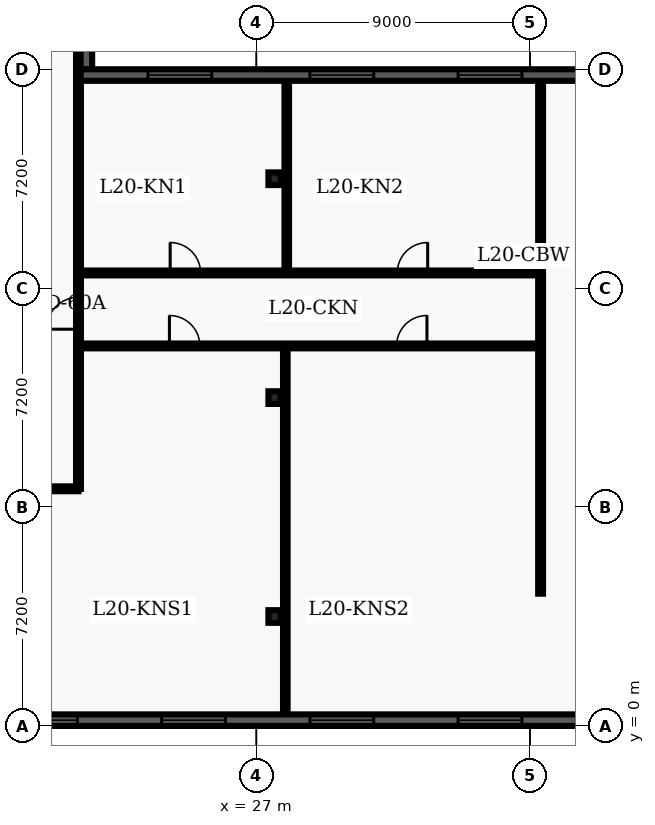
"""IFC4 building model, lengths in metres.
Left out: names, types, materials, properties, quantities, classifications, styles, units other than length and angle.
Written with IfcOpenShell. Run it as: python <this file> out.ifc"""

import sys

from ifc_helpers import new_model, entity, si_unit, converted_unit, direction, frame, origin_with_axes, origin_2d_with_axis, place, context, subcontext, project, spatial, polyline, rectangle, i_section, outline, extrude, element, fill, save


model = new_model("IFC4")
c1 = context("Model", 3, precision=1e-05, world=origin_with_axes(), true_north=direction((0.0, 1.0)))
c2 = subcontext(c1, "Body", "Model", "MODEL_VIEW")
j1 = project(units=[si_unit("LENGTHUNIT", "METRE"), converted_unit("PLANEANGLEUNIT", "DEGREE", entity("IfcPlaneAngleMeasure", 0.017), si_unit("PLANEANGLEUNIT", "RADIAN"), dimensions=[0, 0, 0, 0, 0, 0, 0])], contexts=[c1])
p1 = place(None, origin_with_axes())
s1 = spatial("IfcSite", under=j1, at=p1, CompositionType="ELEMENT")
p2 = place(p1, origin_with_axes())
s2 = spatial("IfcBuilding", under=s1, at=p2, CompositionType="ELEMENT")
p3 = place(p2, frame((0.0, 0.0, 84.6), z_axis=(0.0, 0.0, 1.0), x_axis=(1.0, 0.0, 0.0)))
s3 = spatial("IfcBuildingStorey", under=s2, at=p3, CompositionType="ELEMENT", Elevation=84.6)
for number, where, z_axis, x_axis in (
    (1, (27.6, 3.6, 0.0), (0.0, 0.0, 1.0), (1.0, 0.0, 0.0)),
    (2, (27.6, 10.8, 0.0), (0.0, 0.0, 1.0), (1.0, 0.0, 0.0)),
    (3, (27.6, 18.0, 0.0), (0.0, 0.0, 1.0), (1.0, 0.0, 0.0)),
):
    element("IfcColumn", number, at=place(p3, frame(where, z_axis=z_axis, x_axis=x_axis)), inside=s3, PredefinedType="COLUMN", context=c2, shape_type="SweptSolid", body=[
        extrude(i_section(OverallWidth=0.406, OverallDepth=0.416, WebThickness=0.03, FlangeThickness=0.048, FilletRadius=0.022, at=origin_2d_with_axis()), origin_with_axes(), (0.0, 0.0, 1.0), 4.5),
    ])
p4 = place(p3, frame((2.6, 7.8, 0.0), z_axis=(0.0, 0.0, 1.0), x_axis=(1.0, 0.0, 0.0)))
e4 = element("IfcWall", 4, at=p4, inside=s3, PredefinedType="PARTITIONING", context=c2, shape_type="SweptSolid", body=[
    extrude(outline(polyline([(0.0, -0.08), (18.55, -0.08), (18.55, 0.08), (0.0, 0.08), (0.0, -0.08)])), origin_with_axes(), (0.0, 0.0, 1.0), 3.2),
])
p5 = place(p4, frame((2.501, 0.0, 0.0), z_axis=(0.0, 0.0, 1.0), x_axis=(1.0, 0.0, 0.0)))
e5 = element("IfcOpeningElement", 5, at=p5, cuts=e4, PredefinedType="OPENING", context=c2, shape_type="SweptSolid", body=[
    extrude(rectangle(XDim=1.0, YDim=0.18, at=origin_2d_with_axis()), origin_with_axes(), (0.0, 0.0, 1.0), 2.15),
])
p6 = place(p4, frame((8.018, 0.0, 0.0), z_axis=(0.0, 0.0, 1.0), x_axis=(1.0, 0.0, 0.0)))
e6 = element("IfcOpeningElement", 6, at=p6, cuts=e4, PredefinedType="OPENING", context=c2, shape_type="SweptSolid", body=[
    extrude(rectangle(XDim=1.0, YDim=0.18, at=origin_2d_with_axis()), origin_with_axes(), (0.0, 0.0, 1.0), 2.15),
])
p7 = place(p4, frame((14.762, 0.0, 0.0), z_axis=(0.0, 0.0, 1.0), x_axis=(1.0, 0.0, 0.0)))
e7 = element("IfcOpeningElement", 7, at=p7, cuts=e4, PredefinedType="OPENING", context=c2, shape_type="SweptSolid", body=[
    extrude(rectangle(XDim=1.2, YDim=0.18, at=origin_2d_with_axis()), origin_with_axes(), (0.0, 0.0, 1.0), 2.2),
])
p8 = place(p3, frame((21.15, 7.8, 0.0), z_axis=(0.0, 0.0, 1.0), x_axis=(0.0, 1.0, 0.0)))
e8 = element("IfcWall", 8, at=p8, inside=s3, PredefinedType="PARTITIONING", context=c2, shape_type="SweptSolid", body=[
    extrude(outline(polyline([(0.0, -0.08), (32.7, -0.08), (32.7, 0.08), (0.0, 0.08), (0.0, -0.08)])), origin_with_axes(), (0.0, 0.0, 1.0), 3.2),
])
p9 = place(p8, frame((5.775, 0.0, 0.0), z_axis=(0.0, 0.0, 1.0), x_axis=(1.0, 0.0, 0.0)))
e9 = element("IfcOpeningElement", 9, at=p9, cuts=e8, PredefinedType="OPENING", context=c2, shape_type="SweptSolid", body=[
    extrude(rectangle(XDim=1.05, YDim=0.18, at=origin_2d_with_axis()), origin_with_axes(), (0.0, 0.0, 1.0), 2.15),
])
p10 = place(p3, frame((21.15, 12.5, 0.0), z_axis=(0.0, 0.0, 1.0), x_axis=(1.0, 0.0, 0.0)))
e10 = element("IfcWall", 10, at=p10, inside=s3, PredefinedType="PARTITIONING", context=c2, shape_type="SweptSolid", body=[
    extrude(outline(polyline([(0.0, -0.08), (15.2, -0.08), (15.2, 0.08), (0.0, 0.08), (0.0, -0.08)])), origin_with_axes(), (0.0, 0.0, 1.0), 3.2),
])
p11 = place(p10, frame((3.491, 0.0, 0.0), z_axis=(0.0, 0.0, 1.0), x_axis=(1.0, 0.0, 0.0)))
e11 = element("IfcOpeningElement", 11, at=p11, cuts=e10, PredefinedType="OPENING", context=c2, shape_type="SweptSolid", body=[
    extrude(rectangle(XDim=1.0, YDim=0.18, at=origin_2d_with_axis()), origin_with_axes(), (0.0, 0.0, 1.0), 2.15),
])
p12 = place(p10, frame((10.961, 0.0, 0.0), z_axis=(0.0, 0.0, 1.0), x_axis=(1.0, 0.0, 0.0)))
e12 = element("IfcOpeningElement", 12, at=p12, cuts=e10, PredefinedType="OPENING", context=c2, shape_type="SweptSolid", body=[
    extrude(rectangle(XDim=1.0, YDim=0.18, at=origin_2d_with_axis()), origin_with_axes(), (0.0, 0.0, 1.0), 2.15),
])
p13 = place(p3, frame((21.15, 14.9, 0.0), z_axis=(0.0, 0.0, 1.0), x_axis=(1.0, 0.0, 0.0)))
e13 = element("IfcWall", 13, at=p13, inside=s3, PredefinedType="PARTITIONING", context=c2, shape_type="SweptSolid", body=[
    extrude(outline(polyline([(0.0, -0.08), (15.2, -0.08), (15.2, 0.08), (0.0, 0.08), (0.0, -0.08)])), origin_with_axes(), (0.0, 0.0, 1.0), 3.2),
])
p14 = place(p13, frame((3.515, 0.0, 0.0), z_axis=(0.0, 0.0, 1.0), x_axis=(1.0, 0.0, 0.0)))
e14 = element("IfcOpeningElement", 14, at=p14, cuts=e13, PredefinedType="OPENING", context=c2, shape_type="SweptSolid", body=[
    extrude(rectangle(XDim=1.0, YDim=0.18, at=origin_2d_with_axis()), origin_with_axes(), (0.0, 0.0, 1.0), 2.15),
])
p15 = place(p13, frame((10.986, 0.0, 0.0), z_axis=(0.0, 0.0, 1.0), x_axis=(1.0, 0.0, 0.0)))
e15 = element("IfcOpeningElement", 15, at=p15, cuts=e13, PredefinedType="OPENING", context=c2, shape_type="SweptSolid", body=[
    extrude(rectangle(XDim=1.0, YDim=0.18, at=origin_2d_with_axis()), origin_with_axes(), (0.0, 0.0, 1.0), 2.15),
])
p16 = place(p3, frame((36.35, 4.35, 0.0), z_axis=(0.0, 0.0, 1.0), x_axis=(0.0, 1.0, 0.0)))
e16 = element("IfcWall", 16, at=p16, inside=s3, PredefinedType="PARTITIONING", context=c2, shape_type="SweptSolid", body=[
    extrude(outline(polyline([(0.0, -0.08), (16.95, -0.08), (16.95, 0.08), (0.0, 0.08), (0.0, -0.08)])), origin_with_axes(), (0.0, 0.0, 1.0), 3.2),
])
p17 = place(p3, frame((27.953, 0.36, 0.0), z_axis=(0.0, 0.0, 1.0), x_axis=(0.0, 1.0, 0.0)))
e17 = element("IfcWall", 17, at=p17, inside=s3, PredefinedType="PARTITIONING", context=c2, shape_type="SweptSolid", body=[
    extrude(outline(polyline([(0.0, -0.075), (12.02, -0.075), (12.02, 0.075), (0.0, 0.075), (0.0, -0.075)])), origin_with_axes(), (0.0, 0.0, 1.0), 3.2),
])
p18 = place(p3, frame((28.001, 15.02, 0.0), z_axis=(0.0, 0.0, 1.0), x_axis=(0.0, 1.0, 0.0)))
e18 = element("IfcWall", 18, at=p18, inside=s3, PredefinedType="PARTITIONING", context=c2, shape_type="SweptSolid", body=[
    extrude(outline(polyline([(0.0, -0.075), (6.205, -0.075), (6.205, 0.075), (0.0, 0.075), (0.0, -0.075)])), origin_with_axes(), (0.0, 0.0, 1.0), 3.2),
])
p19 = place(p3, frame((57.22, 0.19, 0.0), z_axis=(0.0, 0.0, 1.0), x_axis=(-1.0, 0.0, 0.0)))
e19 = element("IfcWall", 19, at=p19, inside=s3, PredefinedType="SOLIDWALL", context=c2, shape_type="SweptSolid", body=[
    extrude(outline(polyline([(0.0, -0.19), (54.82, -0.19), (54.82, 0.19), (0.0, 0.19), (0.0, -0.19)])), origin_with_axes(), (0.0, 0.0, 1.0), 4.26),
])
p20 = place(p19, frame((3.037, 0.0, 0.45), z_axis=(0.0, 0.0, 1.0), x_axis=(1.0, 0.0, 0.0)))
e20 = element("IfcOpeningElement", 20, at=p20, cuts=e19, PredefinedType="OPENING", context=c2, shape_type="SweptSolid", body=[
    extrude(rectangle(XDim=2.1, YDim=0.4, at=origin_2d_with_axis()), origin_with_axes(), (0.0, 0.0, 1.0), 2.2),
])
p21 = place(p19, frame((7.912, 0.0, 0.45), z_axis=(0.0, 0.0, 1.0), x_axis=(1.0, 0.0, 0.0)))
e21 = element("IfcOpeningElement", 21, at=p21, cuts=e19, PredefinedType="OPENING", context=c2, shape_type="SweptSolid", body=[
    extrude(rectangle(XDim=2.1, YDim=0.4, at=origin_2d_with_axis()), origin_with_axes(), (0.0, 0.0, 1.0), 2.2),
])
p22 = place(p19, frame((12.786, 0.0, 0.45), z_axis=(0.0, 0.0, 1.0), x_axis=(1.0, 0.0, 0.0)))
e22 = element("IfcOpeningElement", 22, at=p22, cuts=e19, PredefinedType="OPENING", context=c2, shape_type="SweptSolid", body=[
    extrude(rectangle(XDim=2.1, YDim=0.4, at=origin_2d_with_axis()), origin_with_axes(), (0.0, 0.0, 1.0), 2.2),
])
p23 = place(p19, frame((17.661, 0.0, 0.45), z_axis=(0.0, 0.0, 1.0), x_axis=(1.0, 0.0, 0.0)))
e23 = element("IfcOpeningElement", 23, at=p23, cuts=e19, PredefinedType="OPENING", context=c2, shape_type="SweptSolid", body=[
    extrude(rectangle(XDim=2.1, YDim=0.4, at=origin_2d_with_axis()), origin_with_axes(), (0.0, 0.0, 1.0), 2.2),
])
p24 = place(p19, frame((22.535, 0.0, 0.45), z_axis=(0.0, 0.0, 1.0), x_axis=(1.0, 0.0, 0.0)))
e24 = element("IfcOpeningElement", 24, at=p24, cuts=e19, PredefinedType="OPENING", context=c2, shape_type="SweptSolid", body=[
    extrude(rectangle(XDim=2.1, YDim=0.4, at=origin_2d_with_axis()), origin_with_axes(), (0.0, 0.0, 1.0), 2.2),
])
p25 = place(p19, frame((27.41, 0.0, 0.45), z_axis=(0.0, 0.0, 1.0), x_axis=(1.0, 0.0, 0.0)))
e25 = element("IfcOpeningElement", 25, at=p25, cuts=e19, PredefinedType="OPENING", context=c2, shape_type="SweptSolid", body=[
    extrude(rectangle(XDim=2.1, YDim=0.4, at=origin_2d_with_axis()), origin_with_axes(), (0.0, 0.0, 1.0), 2.2),
])
p26 = place(p19, frame((32.285, 0.0, 0.45), z_axis=(0.0, 0.0, 1.0), x_axis=(1.0, 0.0, 0.0)))
e26 = element("IfcOpeningElement", 26, at=p26, cuts=e19, PredefinedType="OPENING", context=c2, shape_type="SweptSolid", body=[
    extrude(rectangle(XDim=2.1, YDim=0.4, at=origin_2d_with_axis()), origin_with_axes(), (0.0, 0.0, 1.0), 2.2),
])
p27 = place(p19, frame((37.159, 0.0, 0.45), z_axis=(0.0, 0.0, 1.0), x_axis=(1.0, 0.0, 0.0)))
e27 = element("IfcOpeningElement", 27, at=p27, cuts=e19, PredefinedType="OPENING", context=c2, shape_type="SweptSolid", body=[
    extrude(rectangle(XDim=2.1, YDim=0.4, at=origin_2d_with_axis()), origin_with_axes(), (0.0, 0.0, 1.0), 2.2),
])
p28 = place(p19, frame((42.034, 0.0, 0.45), z_axis=(0.0, 0.0, 1.0), x_axis=(1.0, 0.0, 0.0)))
e28 = element("IfcOpeningElement", 28, at=p28, cuts=e19, PredefinedType="OPENING", context=c2, shape_type="SweptSolid", body=[
    extrude(rectangle(XDim=2.1, YDim=0.4, at=origin_2d_with_axis()), origin_with_axes(), (0.0, 0.0, 1.0), 2.2),
])
p29 = place(p19, frame((46.908, 0.0, 0.45), z_axis=(0.0, 0.0, 1.0), x_axis=(1.0, 0.0, 0.0)))
e29 = element("IfcOpeningElement", 29, at=p29, cuts=e19, PredefinedType="OPENING", context=c2, shape_type="SweptSolid", body=[
    extrude(rectangle(XDim=2.1, YDim=0.4, at=origin_2d_with_axis()), origin_with_axes(), (0.0, 0.0, 1.0), 2.2),
])
p30 = place(p19, frame((51.783, 0.0, 0.45), z_axis=(0.0, 0.0, 1.0), x_axis=(1.0, 0.0, 0.0)))
e30 = element("IfcOpeningElement", 30, at=p30, cuts=e19, PredefinedType="OPENING", context=c2, shape_type="SweptSolid", body=[
    extrude(rectangle(XDim=2.1, YDim=0.4, at=origin_2d_with_axis()), origin_with_axes(), (0.0, 0.0, 1.0), 2.2),
])
p31 = place(p3, frame((21.41, 45.82, 0.0), z_axis=(0.0, 0.0, 1.0), x_axis=(0.0, -1.0, 0.0)))
e31 = element("IfcWall", 31, at=p31, inside=s3, PredefinedType="SOLIDWALL", context=c2, shape_type="SweptSolid", body=[
    extrude(outline(polyline([(0.0, -0.19), (24.22, -0.19), (24.22, 0.19), (0.0, 0.19), (0.0, -0.19)])), origin_with_axes(), (0.0, 0.0, 1.0), 4.26),
])
p32 = place(p31, frame((2.902, 0.0, 0.45), z_axis=(0.0, 0.0, 1.0), x_axis=(1.0, 0.0, 0.0)))
e32 = element("IfcOpeningElement", 32, at=p32, cuts=e31, PredefinedType="OPENING", context=c2, shape_type="SweptSolid", body=[
    extrude(rectangle(XDim=2.1, YDim=0.4, at=origin_2d_with_axis()), origin_with_axes(), (0.0, 0.0, 1.0), 2.2),
])
p33 = place(p3, frame((21.22, 21.41, 0.0), z_axis=(0.0, 0.0, 1.0), x_axis=(1.0, 0.0, 0.0)))
e33 = element("IfcWall", 33, at=p33, inside=s3, PredefinedType="SOLIDWALL", context=c2, shape_type="SweptSolid", body=[
    extrude(outline(polyline([(0.0, -0.19), (17.18, -0.19), (17.18, 0.19), (0.0, 0.19), (0.0, -0.19)])), origin_with_axes(), (0.0, 0.0, 1.0), 4.26),
])
p34 = place(p33, frame((3.263, 0.0, 0.45), z_axis=(0.0, 0.0, 1.0), x_axis=(1.0, 0.0, 0.0)))
e34 = element("IfcOpeningElement", 34, at=p34, cuts=e33, PredefinedType="OPENING", context=c2, shape_type="SweptSolid", body=[
    extrude(rectangle(XDim=2.1, YDim=0.4, at=origin_2d_with_axis()), origin_with_axes(), (0.0, 0.0, 1.0), 2.2),
])
p35 = place(p33, frame((8.59, 0.0, 0.45), z_axis=(0.0, 0.0, 1.0), x_axis=(1.0, 0.0, 0.0)))
e35 = element("IfcOpeningElement", 35, at=p35, cuts=e33, PredefinedType="OPENING", context=c2, shape_type="SweptSolid", body=[
    extrude(rectangle(XDim=2.1, YDim=0.4, at=origin_2d_with_axis()), origin_with_axes(), (0.0, 0.0, 1.0), 2.2),
])
p36 = place(p33, frame((13.467, 0.0, 0.45), z_axis=(0.0, 0.0, 1.0), x_axis=(1.0, 0.0, 0.0)))
e36 = element("IfcOpeningElement", 36, at=p36, cuts=e33, PredefinedType="OPENING", context=c2, shape_type="SweptSolid", body=[
    extrude(rectangle(XDim=2.1, YDim=0.4, at=origin_2d_with_axis()), origin_with_axes(), (0.0, 0.0, 1.0), 2.2),
])
p37 = place(p8, frame((5.775, 0.0, 0.0), z_axis=(0.0, 0.0, 1.0), x_axis=(1.0, 0.0, 0.0)))
e37 = element("IfcDoor", 37, at=p37, inside=s3, OperationType="SINGLE_SWING_LEFT", PredefinedType="DOOR", context=c2, shape_type="SweptSolid", body=[
    extrude(rectangle(XDim=1.05, YDim=0.09, at=origin_2d_with_axis()), origin_with_axes(), (0.0, 0.0, 1.0), 2.15),
])
fill(e9, e37)
p38 = place(p10, frame((3.491, 0.0, 0.0), z_axis=(0.0, 0.0, 1.0), x_axis=(1.0, 0.0, 0.0)))
e38 = element("IfcDoor", 38, at=p38, inside=s3, OperationType="SINGLE_SWING_LEFT", PredefinedType="DOOR", context=c2, shape_type="SweptSolid", body=[
    extrude(rectangle(XDim=1.0, YDim=0.09, at=origin_2d_with_axis()), origin_with_axes(), (0.0, 0.0, 1.0), 2.15),
])
fill(e11, e38)
p39 = place(p10, frame((10.961, 0.0, 0.0), z_axis=(0.0, 0.0, 1.0), x_axis=(1.0, 0.0, 0.0)))
e39 = element("IfcDoor", 39, at=p39, inside=s3, OperationType="SINGLE_SWING_RIGHT", PredefinedType="DOOR", context=c2, shape_type="SweptSolid", body=[
    extrude(rectangle(XDim=1.0, YDim=0.09, at=origin_2d_with_axis()), origin_with_axes(), (0.0, 0.0, 1.0), 2.15),
])
fill(e12, e39)
p40 = place(p13, frame((3.515, 0.0, 0.0), z_axis=(0.0, 0.0, 1.0), x_axis=(1.0, 0.0, 0.0)))
e40 = element("IfcDoor", 40, at=p40, inside=s3, OperationType="SINGLE_SWING_LEFT", PredefinedType="DOOR", context=c2, shape_type="SweptSolid", body=[
    extrude(rectangle(XDim=1.0, YDim=0.09, at=origin_2d_with_axis()), origin_with_axes(), (0.0, 0.0, 1.0), 2.15),
])
fill(e14, e40)
p41 = place(p13, frame((10.986, 0.0, 0.0), z_axis=(0.0, 0.0, 1.0), x_axis=(1.0, 0.0, 0.0)))
e41 = element("IfcDoor", 41, at=p41, inside=s3, OperationType="SINGLE_SWING_RIGHT", PredefinedType="DOOR", context=c2, shape_type="SweptSolid", body=[
    extrude(rectangle(XDim=1.0, YDim=0.09, at=origin_2d_with_axis()), origin_with_axes(), (0.0, 0.0, 1.0), 2.15),
])
fill(e15, e41)
p42 = place(p19, frame((22.535, 0.0, 0.45), z_axis=(0.0, 0.0, 1.0), x_axis=(1.0, 0.0, 0.0)))
e42 = element("IfcWindow", 42, at=p42, inside=s3, PredefinedType="WINDOW", context=c2, shape_type="SweptSolid", body=[
    extrude(rectangle(XDim=2.1, YDim=0.09, at=origin_2d_with_axis()), origin_with_axes(), (0.0, 0.0, 1.0), 2.2),
])
fill(e24, e42)
p43 = place(p19, frame((27.41, 0.0, 0.45), z_axis=(0.0, 0.0, 1.0), x_axis=(1.0, 0.0, 0.0)))
e43 = element("IfcWindow", 43, at=p43, inside=s3, PredefinedType="WINDOW", context=c2, shape_type="SweptSolid", body=[
    extrude(rectangle(XDim=2.1, YDim=0.09, at=origin_2d_with_axis()), origin_with_axes(), (0.0, 0.0, 1.0), 2.2),
])
fill(e25, e43)
p44 = place(p19, frame((32.285, 0.0, 0.45), z_axis=(0.0, 0.0, 1.0), x_axis=(1.0, 0.0, 0.0)))
e44 = element("IfcWindow", 44, at=p44, inside=s3, PredefinedType="WINDOW", context=c2, shape_type="SweptSolid", body=[
    extrude(rectangle(XDim=2.1, YDim=0.09, at=origin_2d_with_axis()), origin_with_axes(), (0.0, 0.0, 1.0), 2.2),
])
fill(e26, e44)
p45 = place(p19, frame((37.159, 0.0, 0.45), z_axis=(0.0, 0.0, 1.0), x_axis=(1.0, 0.0, 0.0)))
e45 = element("IfcWindow", 45, at=p45, inside=s3, PredefinedType="WINDOW", context=c2, shape_type="SweptSolid", body=[
    extrude(rectangle(XDim=2.1, YDim=0.09, at=origin_2d_with_axis()), origin_with_axes(), (0.0, 0.0, 1.0), 2.2),
])
fill(e27, e45)
p46 = place(p33, frame((3.263, 0.0, 0.45), z_axis=(0.0, 0.0, 1.0), x_axis=(1.0, 0.0, 0.0)))
e46 = element("IfcWindow", 46, at=p46, inside=s3, PredefinedType="WINDOW", context=c2, shape_type="SweptSolid", body=[
    extrude(rectangle(XDim=2.1, YDim=0.09, at=origin_2d_with_axis()), origin_with_axes(), (0.0, 0.0, 1.0), 2.2),
])
fill(e34, e46)
p47 = place(p33, frame((8.59, 0.0, 0.45), z_axis=(0.0, 0.0, 1.0), x_axis=(1.0, 0.0, 0.0)))
e47 = element("IfcWindow", 47, at=p47, inside=s3, PredefinedType="WINDOW", context=c2, shape_type="SweptSolid", body=[
    extrude(rectangle(XDim=2.1, YDim=0.09, at=origin_2d_with_axis()), origin_with_axes(), (0.0, 0.0, 1.0), 2.2),
])
fill(e35, e47)
p48 = place(p33, frame((13.467, 0.0, 0.45), z_axis=(0.0, 0.0, 1.0), x_axis=(1.0, 0.0, 0.0)))
e48 = element("IfcWindow", 48, at=p48, inside=s3, PredefinedType="WINDOW", context=c2, shape_type="SweptSolid", body=[
    extrude(rectangle(XDim=2.1, YDim=0.09, at=origin_2d_with_axis()), origin_with_axes(), (0.0, 0.0, 1.0), 2.2),
])
fill(e36, e48)
save(model, sys.argv[1])
